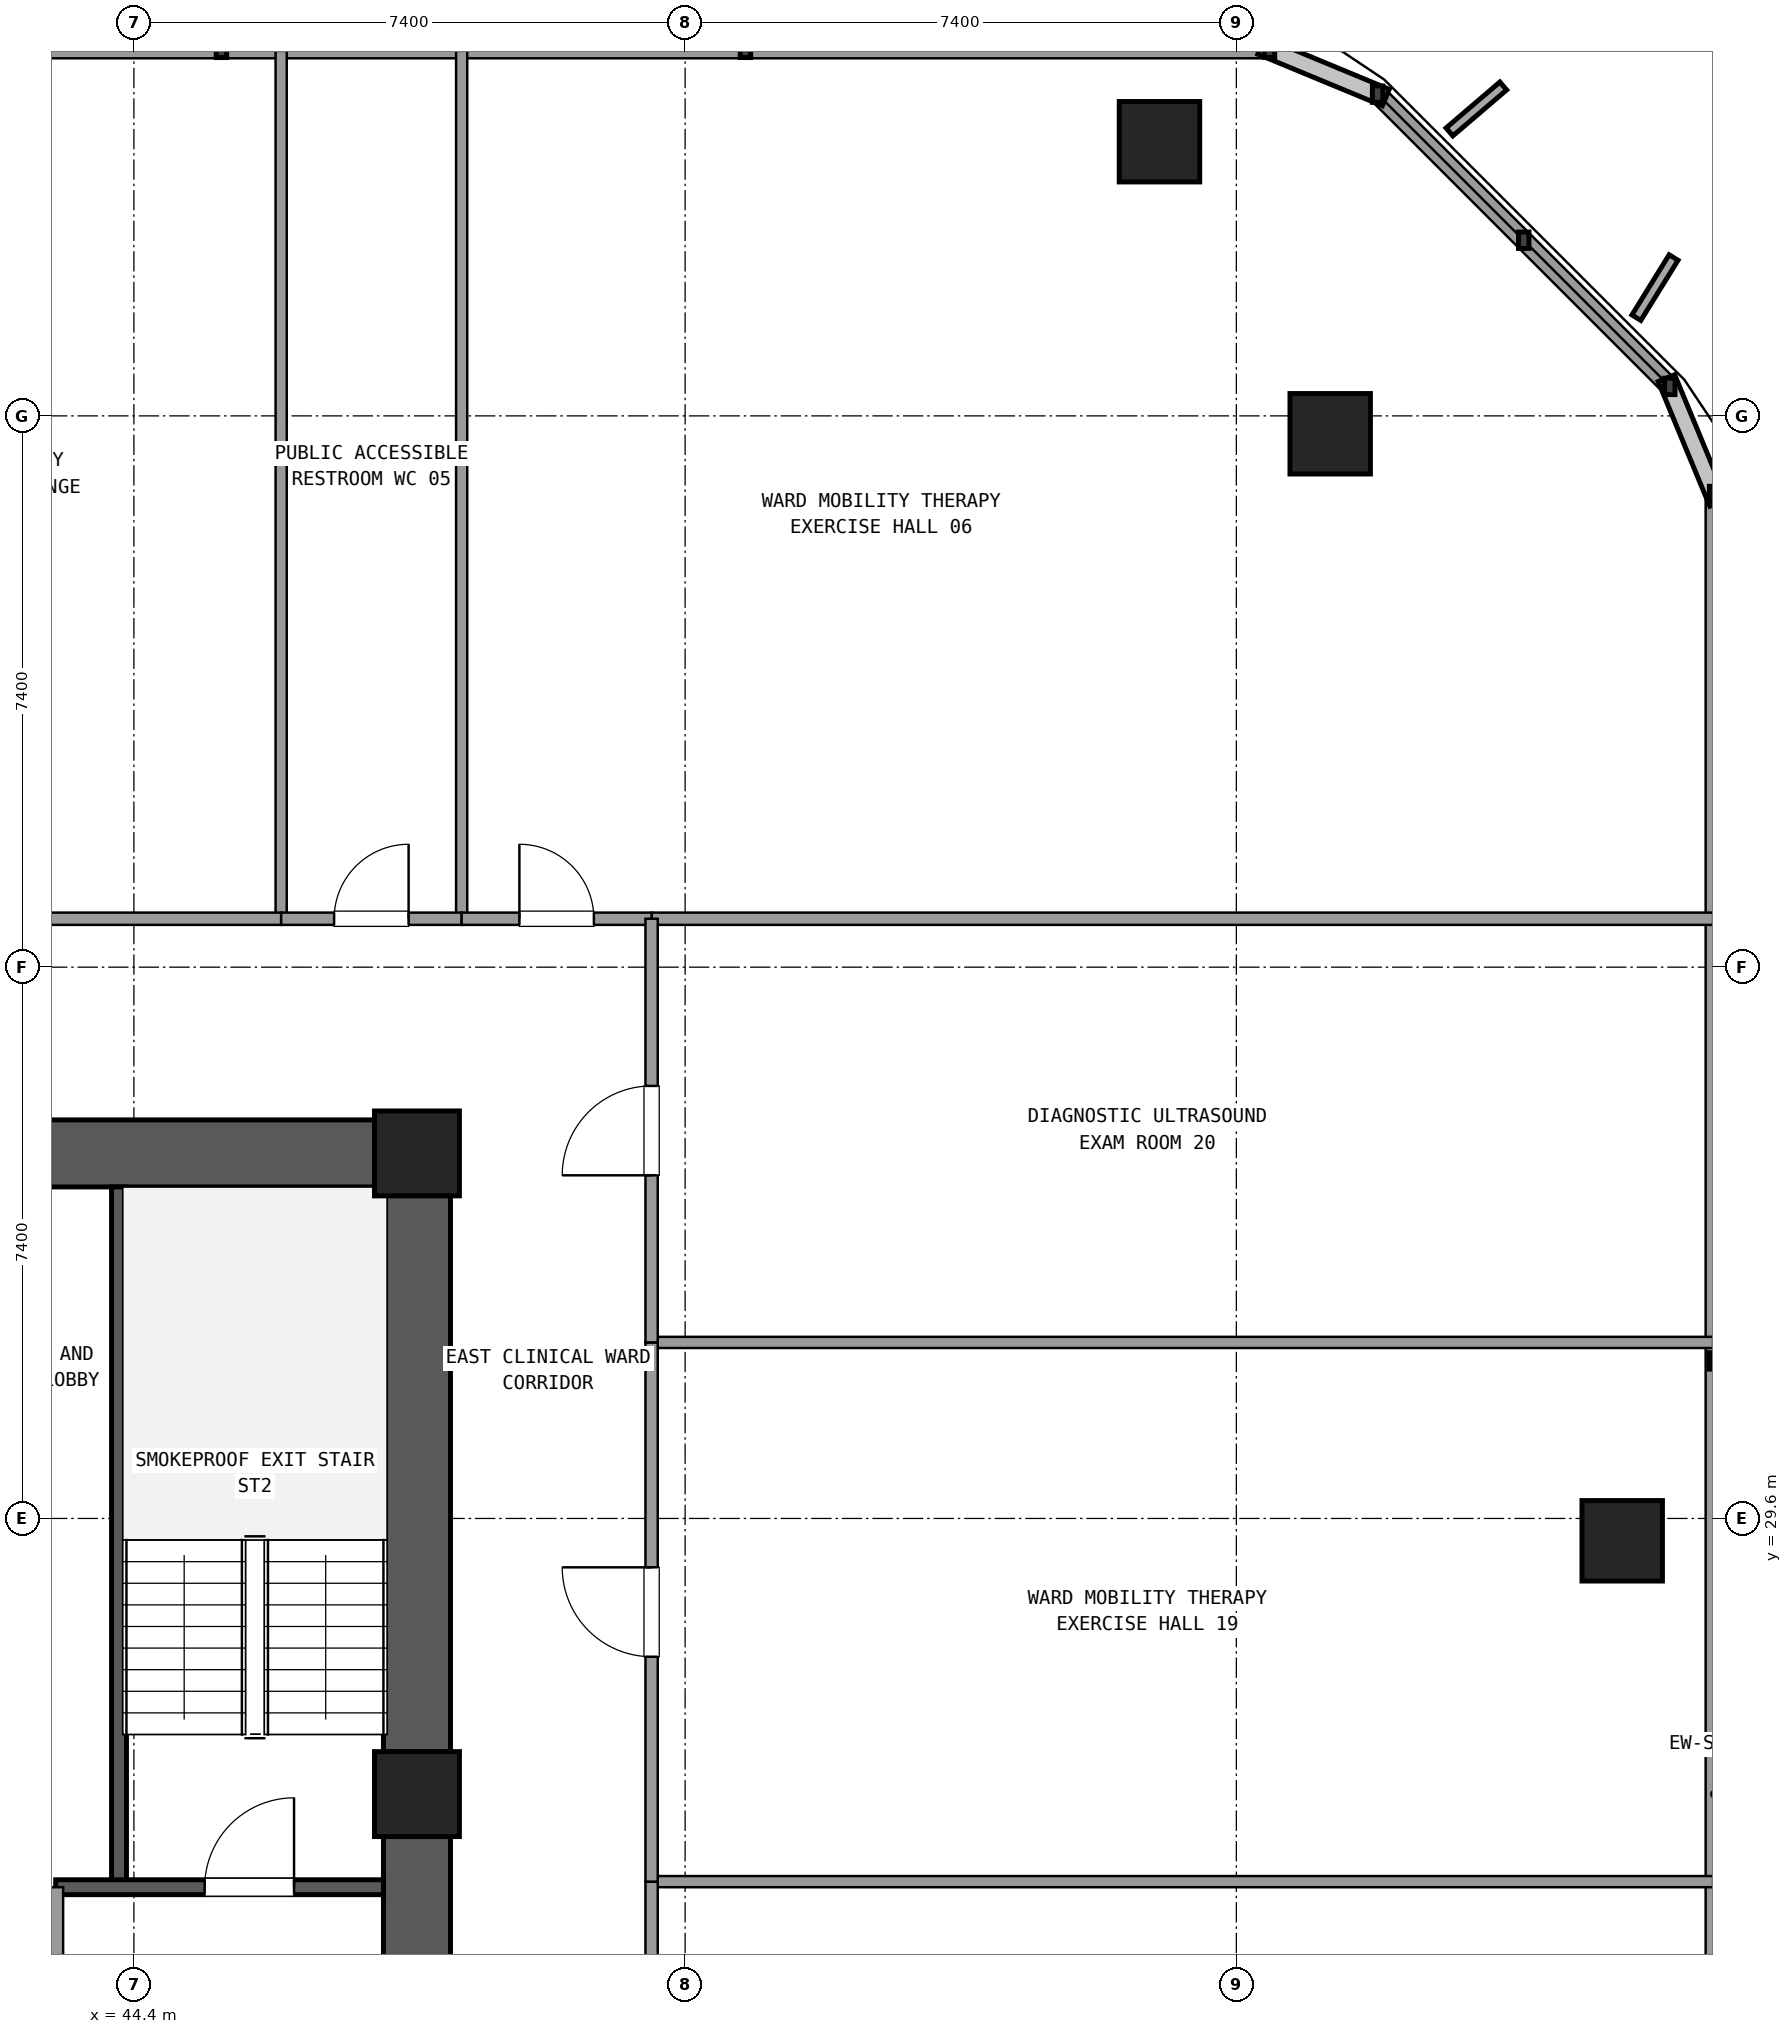
"""IFC4 building model, lengths in metres.
Left out: names, types, materials, properties, quantities, classifications, styles, units other than length and angle.
Written with IfcOpenShell. Run it as: python <this file> out.ifc"""

import sys

from ifc_helpers import new_model, si_unit, direction, frame, frame_2d, origin, origin_2d, place, context, subcontext, project, spatial, rectangle, extrude, element, fill, save


model = new_model("IFC4")
c1 = context("Model", 3, precision=1e-05, world=origin(), true_north=direction((0.0, 1.0)))
c2 = subcontext(c1, "Body", "Model", "MODEL_VIEW")
j1 = project(units=[si_unit("LENGTHUNIT", "METRE"), si_unit("PLANEANGLEUNIT", "RADIAN")], contexts=[c1])
p1 = place(None, origin())
s1 = spatial("IfcSite", under=j1, at=p1, CompositionType="ELEMENT")
p2 = place(p1, origin())
s2 = spatial("IfcBuilding", under=s1, at=p2, CompositionType="ELEMENT")
p3 = place(p2, frame((0.0, 0.0, 38.34)))
s3 = spatial("IfcBuildingStorey", under=s2, at=p3, CompositionType="ELEMENT", Elevation=38.34)
for number, where, z_axis, x_axis in (
    (1, (48.2, 25.9, 0.0), (0.0, 0.0, 1.0), (1.0, 0.0, 0.0)),
    (2, (48.2, 34.5, 0.0), (0.0, 0.0, 1.0), (1.0, 0.0, 0.0)),
):
    element("IfcColumn", number, at=place(p3, frame(where, z_axis=z_axis, x_axis=x_axis)), inside=s3, PredefinedType="COLUMN", context=c2, shape_type="SweptSolid", body=[
        extrude(rectangle(XDim=1.14, YDim=1.14, at=origin_2d()), origin(), (0.0, 0.0, 1.0), 3.6),
    ])
p4 = place(p3, frame((48.2, 17.865, 0.0), z_axis=(0.0, 0.0, 1.0), x_axis=(0.0, 1.0, 0.0)))
e3 = element("IfcWall", 3, at=p4, inside=s3, PredefinedType="SHEAR", context=c2, shape_type="SweptSolid", body=[
    extrude(rectangle(XDim=7.47, YDim=0.9, at=frame_2d((3.735, 0.0))), origin(), (0.0, 0.0, 1.0), 3.32),
])
p5 = place(p4, frame((4.185, 0.0, 0.0)))
e4 = element("IfcOpeningElement", 4, at=p5, cuts=e3, PredefinedType="OPENING", context=c2, shape_type="SweptSolid", body=[
    extrude(rectangle(XDim=1.2, YDim=2.15, at=frame_2d((0.6, 1.075))), frame((0.0, 0.46, 0.0), z_axis=(0.0, -1.0, 0.0), x_axis=(1.0, 0.0, 0.0)), (0.0, 0.0, 1.0), 0.92),
])
p6 = place(p3, frame((48.2, 26.465, 0.0), z_axis=(0.0, 0.0, 1.0), x_axis=(0.0, 1.0, 0.0)))
e5 = element("IfcWall", 5, at=p6, inside=s3, PredefinedType="SHEAR", context=c2, shape_type="SweptSolid", body=[
    extrude(rectangle(XDim=7.47, YDim=0.9, at=frame_2d((3.735, 0.0))), origin(), (0.0, 0.0, 1.0), 3.32),
])
p7 = place(p3, frame((47.635, 34.5, 0.0), z_axis=(0.0, 0.0, 1.0), x_axis=(-1.0, 0.0, 0.0)))
e6 = element("IfcWall", 6, at=p7, inside=s3, PredefinedType="SHEAR", context=c2, shape_type="SweptSolid", body=[
    extrude(rectangle(XDim=10.07, YDim=0.9, at=frame_2d((5.035, 0.0))), origin(), (0.0, 0.0, 1.0), 3.32),
])
p8 = place(p7, frame((4.535, 0.0, 0.0)))
e7 = element("IfcOpeningElement", 7, at=p8, cuts=e6, PredefinedType="OPENING", context=c2, shape_type="SweptSolid", body=[
    extrude(rectangle(XDim=1.6, YDim=2.2, at=frame_2d((0.8, 1.1))), frame((0.0, 0.46, 0.0), z_axis=(0.0, -1.0, 0.0), x_axis=(1.0, 0.0, 0.0)), (0.0, 0.0, 1.0), 0.92),
])
for number, where, z_axis, x_axis in (
    (8, (64.38, 29.3, 0.0), (0.0, 0.0, 1.0), (1.0, 0.0, 0.0)),
    (9, (60.46, 44.16, 0.0), (0.0, 0.0, 1.0), (1.0, 0.0, 0.0)),
    (10, (58.168, 48.08, 0.0), (0.0, 0.0, 1.0), (1.0, 0.0, 0.0)),
):
    element("IfcColumn", number, at=place(p3, frame(where, z_axis=z_axis, x_axis=x_axis)), inside=s3, PredefinedType="COLUMN", context=c2, shape_type="SweptSolid", body=[
        extrude(rectangle(XDim=1.08, YDim=1.08, at=origin_2d()), origin(), (0.0, 0.0, 1.0), 3.6),
    ])
p9 = place(p3, frame((65.62, 8.455, 0.0), z_axis=(0.0, 0.0, 1.0), x_axis=(0.0, 1.0, 0.0)))
e11 = element("IfcWall", 11, at=p9, inside=s3, PredefinedType="SOLIDWALL", context=c2, shape_type="SweptSolid", body=[
    extrude(rectangle(XDim=34.89, YDim=0.24, at=frame_2d((17.445, 0.0))), origin(), (0.0, 0.0, 1.0), 0.85),
])
p10 = place(p3, frame((65.019, 44.796, 0.0), z_axis=(0.0, 0.0, 1.0), x_axis=(-0.707106781187, 0.707106781187, 0.0)))
e12 = element("IfcWall", 12, at=p10, inside=s3, PredefinedType="SOLIDWALL", context=c2, shape_type="SweptSolid", body=[
    extrude(rectangle(XDim=5.548, YDim=0.24, at=frame_2d((2.774, 0.0))), origin(), (0.0, 0.0, 1.0), 0.85),
])
p11 = place(p3, frame((59.645, 49.32, 0.0), z_axis=(0.0, 0.0, 1.0), x_axis=(-1.0, 0.0, 0.0)))
e13 = element("IfcWall", 13, at=p11, inside=s3, PredefinedType="SOLIDWALL", context=c2, shape_type="SweptSolid", body=[
    extrude(rectangle(XDim=21.105, YDim=0.24, at=frame_2d((10.552, 0.0))), origin(), (0.0, 0.0, 1.0), 0.85),
])
p12 = place(p3, frame((44.2, 24.65, 0.0), z_axis=(0.0, 0.0, 1.0), x_axis=(0.0, 1.0, 0.0)))
e14 = element("IfcWall", 14, at=p12, inside=s3, PredefinedType="SHEAR", context=c2, shape_type="SweptSolid", body=[
    extrude(rectangle(XDim=9.4, YDim=0.2, at=frame_2d((4.7, 0.0))), origin(), (0.0, 0.0, 1.0), 3.32),
])
p13 = place(p3, frame((43.35, 24.65, 0.0), z_axis=(0.0, 0.0, 1.0), x_axis=(1.0, 0.0, 0.0)))
e15 = element("IfcWall", 15, at=p13, inside=s3, PredefinedType="SHEAR", context=c2, shape_type="SweptSolid", body=[
    extrude(rectangle(XDim=4.4, YDim=0.2, at=frame_2d((2.2, 0.0))), origin(), (0.0, 0.0, 1.0), 3.32),
])
p14 = place(p13, frame((2.0, 0.0, 0.0)))
e16 = element("IfcOpeningElement", 16, at=p14, cuts=e15, PredefinedType="OPENING", context=c2, shape_type="SweptSolid", body=[
    extrude(rectangle(XDim=1.2, YDim=2.15, at=frame_2d((0.6, 1.075))), frame((0.0, 0.11, 0.0), z_axis=(0.0, -1.0, 0.0), x_axis=(1.0, 0.0, 0.0)), (0.0, 0.0, 1.0), 0.22),
])
p15 = place(p3, frame((43.35, 17.75, 0.0), z_axis=(0.0, 0.0, 1.0), x_axis=(0.0, 1.0, 0.0)))
e17 = element("IfcWall", 17, at=p15, inside=s3, PredefinedType="SOLIDWALL", context=c2, shape_type="SweptSolid", body=[
    extrude(rectangle(XDim=6.9, YDim=0.2, at=frame_2d((3.45, 0.0))), origin(), (0.0, 0.0, 1.0), 2.61),
])
p16 = place(p15, frame((4.15, 0.0, 0.0)))
e18 = element("IfcOpeningElement", 18, at=p16, cuts=e17, PredefinedType="OPENING", context=c2, shape_type="SweptSolid", body=[
    extrude(rectangle(XDim=1.2, YDim=2.15, at=frame_2d((0.6, 1.075))), frame((0.0, 0.11, 0.0), z_axis=(0.0, -1.0, 0.0), x_axis=(1.0, 0.0, 0.0)), (0.0, 0.0, 1.0), 0.22),
])
p17 = place(p3, frame((51.35, 37.65, 0.0), z_axis=(0.0, 0.0, 1.0), x_axis=(1.0, 0.0, 0.0)))
e19 = element("IfcWall", 19, at=p17, inside=s3, PredefinedType="PARTITIONING", context=c2, shape_type="SweptSolid", body=[
    extrude(rectangle(XDim=14.25, YDim=0.165, at=frame_2d((7.125, 0.0))), origin(), (0.0, 0.0, 1.0), 2.61),
])
p18 = place(p3, frame((46.377, 37.65, 0.0), z_axis=(0.0, 0.0, 1.0), x_axis=(0.0, 1.0, 0.0)))
e20 = element("IfcWall", 20, at=p18, inside=s3, PredefinedType="PARTITIONING", context=c2, shape_type="SweptSolid", body=[
    extrude(rectangle(XDim=11.65, YDim=0.15, at=frame_2d((5.825, 0.0))), origin(), (0.0, 0.0, 1.0), 2.61),
])
p19 = place(p3, frame((35.2, 37.65, 0.0), z_axis=(0.0, 0.0, 1.0), x_axis=(1.0, 0.0, 0.0)))
e21 = element("IfcWall", 21, at=p19, inside=s3, PredefinedType="PARTITIONING", context=c2, shape_type="SweptSolid", body=[
    extrude(rectangle(XDim=11.177, YDim=0.165, at=frame_2d((5.588, 0.0))), origin(), (0.0, 0.0, 1.0), 2.61),
])
p20 = place(p19, frame((4.989, 0.0, 0.0)))
e22 = element("IfcOpeningElement", 22, at=p20, cuts=e21, PredefinedType="OPENING", context=c2, shape_type="SweptSolid", body=[
    extrude(rectangle(XDim=1.2, YDim=2.15, at=frame_2d((0.6, 1.075))), frame((0.0, 0.093, 0.0), z_axis=(0.0, -1.0, 0.0), x_axis=(1.0, 0.0, 0.0)), (0.0, 0.0, 1.0), 0.185),
])
p21 = place(p3, frame((48.8, 37.65, 0.0), z_axis=(0.0, 0.0, 1.0), x_axis=(0.0, 1.0, 0.0)))
e23 = element("IfcWall", 23, at=p21, inside=s3, PredefinedType="PARTITIONING", context=c2, shape_type="SweptSolid", body=[
    extrude(rectangle(XDim=11.65, YDim=0.15, at=frame_2d((5.825, 0.0))), origin(), (0.0, 0.0, 1.0), 2.61),
])
p22 = place(p3, frame((46.377, 37.65, 0.0), z_axis=(0.0, 0.0, 1.0), x_axis=(1.0, 0.0, 0.0)))
e24 = element("IfcWall", 24, at=p22, inside=s3, PredefinedType="PARTITIONING", context=c2, shape_type="SweptSolid", body=[
    extrude(rectangle(XDim=2.423, YDim=0.165, at=frame_2d((1.211, 0.0))), origin(), (0.0, 0.0, 1.0), 2.61),
])
p23 = place(p22, frame((0.711, 0.0, 0.0)))
e25 = element("IfcOpeningElement", 25, at=p23, cuts=e24, PredefinedType="OPENING", context=c2, shape_type="SweptSolid", body=[
    extrude(rectangle(XDim=1.0, YDim=2.15, at=frame_2d((0.5, 1.075))), frame((0.0, 0.093, 0.0), z_axis=(0.0, -1.0, 0.0), x_axis=(1.0, 0.0, 0.0)), (0.0, 0.0, 1.0), 0.185),
])
p24 = place(p3, frame((48.8, 37.65, 0.0), z_axis=(0.0, 0.0, 1.0), x_axis=(1.0, 0.0, 0.0)))
e26 = element("IfcWall", 26, at=p24, inside=s3, PredefinedType="PARTITIONING", context=c2, shape_type="SweptSolid", body=[
    extrude(rectangle(XDim=2.55, YDim=0.165, at=frame_2d((1.275, 0.0))), origin(), (0.0, 0.0, 1.0), 2.61),
])
p25 = place(p24, frame((0.775, 0.0, 0.0)))
e27 = element("IfcOpeningElement", 27, at=p25, cuts=e26, PredefinedType="OPENING", context=c2, shape_type="SweptSolid", body=[
    extrude(rectangle(XDim=1.0, YDim=2.15, at=frame_2d((0.5, 1.075))), frame((0.0, 0.093, 0.0), z_axis=(0.0, -1.0, 0.0), x_axis=(1.0, 0.0, 0.0)), (0.0, 0.0, 1.0), 0.185),
])
p26 = place(p3, frame((51.35, 24.725, 0.0), z_axis=(0.0, 0.0, 1.0), x_axis=(1.0, 0.0, 0.0)))
e28 = element("IfcWall", 28, at=p26, inside=s3, PredefinedType="PARTITIONING", context=c2, shape_type="SweptSolid", body=[
    extrude(rectangle(XDim=14.25, YDim=0.15, at=frame_2d((7.125, 0.0))), origin(), (0.0, 0.0, 1.0), 2.61),
])
p27 = place(p3, frame((51.35, 20.072, 0.0), z_axis=(0.0, 0.0, 1.0), x_axis=(0.0, 1.0, 0.0)))
e29 = element("IfcWall", 29, at=p27, inside=s3, PredefinedType="PARTITIONING", context=c2, shape_type="SweptSolid", body=[
    extrude(rectangle(XDim=4.653, YDim=0.165, at=frame_2d((2.327, 0.0))), origin(), (0.0, 0.0, 1.0), 2.61),
])
p28 = place(p27, frame((1.727, 0.0, 0.0)))
e30 = element("IfcOpeningElement", 30, at=p28, cuts=e29, PredefinedType="OPENING", context=c2, shape_type="SweptSolid", body=[
    extrude(rectangle(XDim=1.2, YDim=2.15, at=frame_2d((0.6, 1.075))), frame((0.0, 0.093, 0.0), z_axis=(0.0, -1.0, 0.0), x_axis=(1.0, 0.0, 0.0)), (0.0, 0.0, 1.0), 0.185),
])
p29 = place(p3, frame((51.35, 31.963, 0.0), z_axis=(0.0, 0.0, 1.0), x_axis=(1.0, 0.0, 0.0)))
e31 = element("IfcWall", 31, at=p29, inside=s3, PredefinedType="PARTITIONING", context=c2, shape_type="SweptSolid", body=[
    extrude(rectangle(XDim=14.25, YDim=0.15, at=frame_2d((7.125, 0.0))), origin(), (0.0, 0.0, 1.0), 2.61),
])
p30 = place(p3, frame((51.35, 24.725, 0.0), z_axis=(0.0, 0.0, 1.0), x_axis=(0.0, 1.0, 0.0)))
e32 = element("IfcWall", 32, at=p30, inside=s3, PredefinedType="PARTITIONING", context=c2, shape_type="SweptSolid", body=[
    extrude(rectangle(XDim=7.238, YDim=0.165, at=frame_2d((3.619, 0.0))), origin(), (0.0, 0.0, 1.0), 2.61),
])
p31 = place(p30, frame((3.019, 0.0, 0.0)))
e33 = element("IfcOpeningElement", 33, at=p31, cuts=e32, PredefinedType="OPENING", context=c2, shape_type="SweptSolid", body=[
    extrude(rectangle(XDim=1.2, YDim=2.15, at=frame_2d((0.6, 1.075))), frame((0.0, 0.093, 0.0), z_axis=(0.0, -1.0, 0.0), x_axis=(1.0, 0.0, 0.0)), (0.0, 0.0, 1.0), 0.185),
])
p32 = place(p3, frame((51.35, 31.963, 0.0), z_axis=(0.0, 0.0, 1.0), x_axis=(0.0, 1.0, 0.0)))
e34 = element("IfcWall", 34, at=p32, inside=s3, PredefinedType="PARTITIONING", context=c2, shape_type="SweptSolid", body=[
    extrude(rectangle(XDim=5.687, YDim=0.165, at=frame_2d((2.844, 0.0))), origin(), (0.0, 0.0, 1.0), 2.61),
])
p33 = place(p32, frame((2.243, 0.0, 0.0)))
e35 = element("IfcOpeningElement", 35, at=p33, cuts=e34, PredefinedType="OPENING", context=c2, shape_type="SweptSolid", body=[
    extrude(rectangle(XDim=1.2, YDim=2.15, at=frame_2d((0.6, 1.075))), frame((0.0, 0.093, 0.0), z_axis=(0.0, -1.0, 0.0), x_axis=(1.0, 0.0, 0.0)), (0.0, 0.0, 1.0), 0.185),
])
p34 = place(p14, origin())
e36 = element("IfcDoor", 36, at=p34, inside=s3, OperationType="SINGLE_SWING_RIGHT", PredefinedType="DOOR", context=c2, shape_type="SweptSolid", body=[
    extrude(rectangle(XDim=1.2, YDim=2.15, at=frame_2d((0.6, 1.075))), frame((0.0, 0.025, 0.0), z_axis=(0.0, -1.0, 0.0), x_axis=(1.0, 0.0, 0.0)), (0.0, 0.0, 1.0), 0.05),
])
fill(e16, e36)
p35 = place(p23, origin())
e37 = element("IfcDoor", 37, at=p35, inside=s3, OperationType="SINGLE_SWING_RIGHT", PredefinedType="DOOR", context=c2, shape_type="SweptSolid", body=[
    extrude(rectangle(XDim=1.0, YDim=2.15, at=frame_2d((0.5, 1.075))), frame((0.0, 0.025, 0.0), z_axis=(0.0, -1.0, 0.0), x_axis=(1.0, 0.0, 0.0)), (0.0, 0.0, 1.0), 0.05),
])
fill(e25, e37)
p36 = place(p25, origin())
e38 = element("IfcDoor", 38, at=p36, inside=s3, OperationType="SINGLE_SWING_LEFT", PredefinedType="DOOR", context=c2, shape_type="SweptSolid", body=[
    extrude(rectangle(XDim=1.0, YDim=2.15, at=frame_2d((0.5, 1.075))), frame((0.0, 0.025, 0.0), z_axis=(0.0, -1.0, 0.0), x_axis=(1.0, 0.0, 0.0)), (0.0, 0.0, 1.0), 0.05),
])
fill(e27, e38)
p37 = place(p31, origin())
e39 = element("IfcDoor", 39, at=p37, inside=s3, OperationType="SINGLE_SWING_RIGHT", PredefinedType="DOOR", context=c2, shape_type="SweptSolid", body=[
    extrude(rectangle(XDim=1.2, YDim=2.15, at=frame_2d((0.6, 1.075))), frame((0.0, 0.025, 0.0), z_axis=(0.0, -1.0, 0.0), x_axis=(1.0, 0.0, 0.0)), (0.0, 0.0, 1.0), 0.05),
])
fill(e33, e39)
p38 = place(p33, origin())
e40 = element("IfcDoor", 40, at=p38, inside=s3, OperationType="SINGLE_SWING_LEFT", PredefinedType="DOOR", context=c2, shape_type="SweptSolid", body=[
    extrude(rectangle(XDim=1.2, YDim=2.15, at=frame_2d((0.6, 1.075))), frame((0.0, 0.025, 0.0), z_axis=(0.0, -1.0, 0.0), x_axis=(1.0, 0.0, 0.0)), (0.0, 0.0, 1.0), 0.05),
])
fill(e35, e40)
save(model, sys.argv[1])
